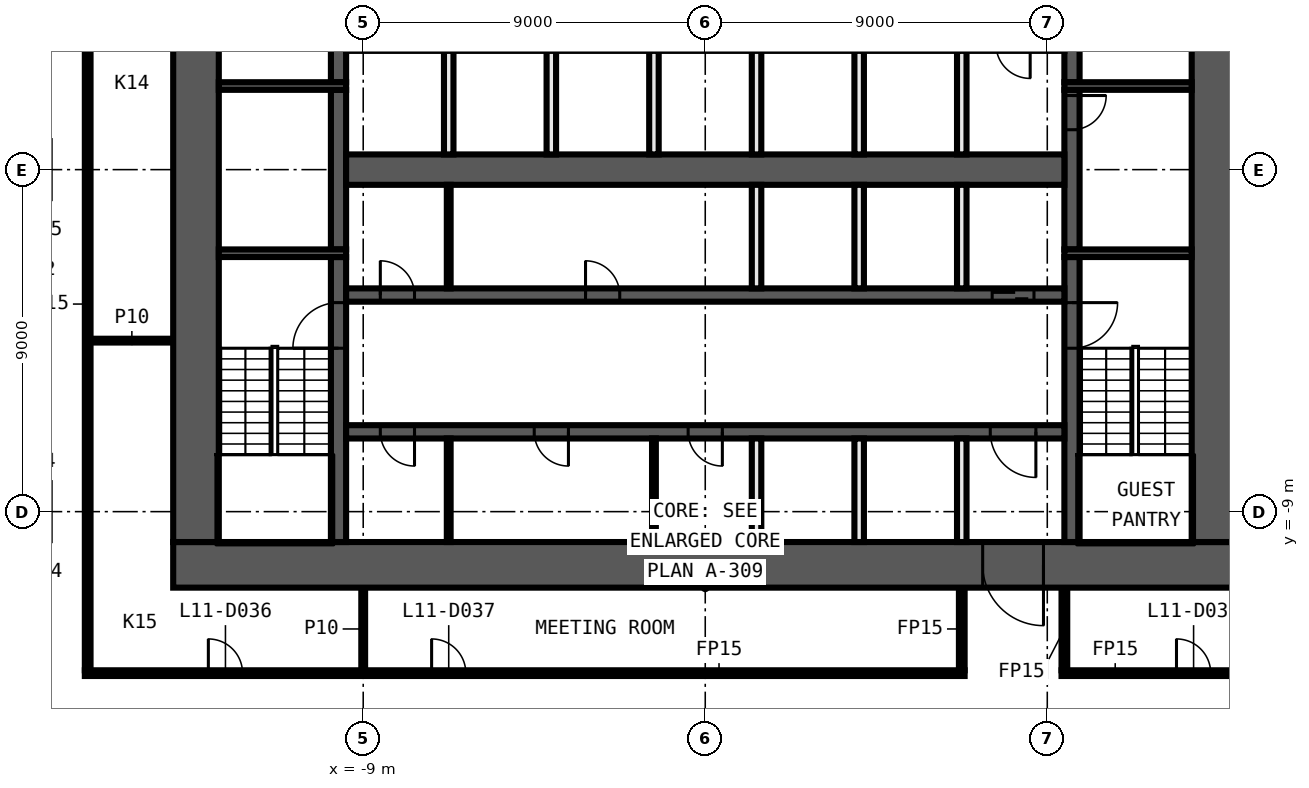
"""IFC4 building model, lengths in metres.
Left out: names, types, materials, properties, quantities, classifications, styles, units other than length and angle.
Written with IfcOpenShell. Run it as: python <this file> out.ifc"""

import sys

from ifc_helpers import new_model, si_unit, direction, frame, frame_2d, origin, place, context, subcontext, project, spatial, rectangle, extrude, element, fill, save


model = new_model("IFC4")
c1 = context("Model", 3, precision=1e-05, world=origin(), true_north=direction((0.0, 1.0)))
c2 = subcontext(c1, "Body", "Model", "MODEL_VIEW")
j1 = project(units=[si_unit("LENGTHUNIT", "METRE"), si_unit("PLANEANGLEUNIT", "RADIAN")], contexts=[c1])
p1 = place(None, origin())
s1 = spatial("IfcSite", under=j1, at=p1, CompositionType="ELEMENT")
p2 = place(p1, origin())
s2 = spatial("IfcBuilding", under=s1, at=p2, CompositionType="ELEMENT")
p3 = place(p2, frame((0.0, 0.0, 62.5)))
s3 = spatial("IfcBuildingStorey", under=s2, at=p3, CompositionType="ELEMENT", Elevation=62.5)
p4 = place(p3, frame((-16.325, -13.25, 0.0), z_axis=(0.0, 0.0, 1.0), x_axis=(1.0, 0.0, 0.0)))
e1 = element("IfcWall", 1, at=p4, inside=s3, PredefinedType="PARTITIONING", context=c2, shape_type="SweptSolid", body=[
    extrude(rectangle(XDim=23.15, YDim=0.15, at=frame_2d((11.575, 0.0))), origin(), (0.0, 0.0, 1.0), 3.3),
])
p5 = place(p4, frame((3.25, 0.0, 0.0)))
e2 = element("IfcOpeningElement", 2, at=p5, cuts=e1, PredefinedType="OPENING", context=c2, shape_type="SweptSolid", body=[
    extrude(rectangle(XDim=0.9, YDim=2.1, at=frame_2d((0.45, 1.05))), frame((0.0, 0.085, 0.0), z_axis=(0.0, -1.0, 0.0), x_axis=(1.0, 0.0, 0.0)), (0.0, 0.0, 1.0), 0.17),
])
p6 = place(p4, frame((9.125, 0.0, 0.0)))
e3 = element("IfcOpeningElement", 3, at=p6, cuts=e1, PredefinedType="OPENING", context=c2, shape_type="SweptSolid", body=[
    extrude(rectangle(XDim=0.9, YDim=2.1, at=frame_2d((0.45, 1.05))), frame((0.0, 0.085, 0.0), z_axis=(0.0, -1.0, 0.0), x_axis=(1.0, 0.0, 0.0)), (0.0, 0.0, 1.0), 0.17),
])
p7 = place(p3, frame((9.375, -13.25, 0.0), z_axis=(0.0, 0.0, 1.0), x_axis=(1.0, 0.0, 0.0)))
e4 = element("IfcWall", 4, at=p7, inside=s3, PredefinedType="PARTITIONING", context=c2, shape_type="SweptSolid", body=[
    extrude(rectangle(XDim=6.95, YDim=0.15, at=frame_2d((3.475, 0.0))), origin(), (0.0, 0.0, 1.0), 3.3),
])
p8 = place(p7, frame((3.025, 0.0, 0.0)))
e5 = element("IfcOpeningElement", 5, at=p8, cuts=e4, PredefinedType="OPENING", context=c2, shape_type="SweptSolid", body=[
    extrude(rectangle(XDim=0.9, YDim=2.1, at=frame_2d((0.45, 1.05))), frame((0.0, 0.085, 0.0), z_axis=(0.0, -1.0, 0.0), x_axis=(1.0, 0.0, 0.0)), (0.0, 0.0, 1.0), 0.17),
])
p9 = place(p3, frame((-16.175, -4.5, 0.0), z_axis=(0.0, 0.0, 1.0), x_axis=(1.0, 0.0, 0.0)))
e6 = element("IfcWall", 6, at=p9, inside=s3, PredefinedType="PARTITIONING", context=c2, shape_type="SweptSolid", body=[
    extrude(rectangle(XDim=2.175, YDim=0.1, at=frame_2d((1.087, 0.0))), origin(), (0.0, 0.0, 1.0), 3.3),
])
for number, where, z_axis, x_axis in (
    (7, (9.45, -13.175, 0.0), (0.0, 0.0, 1.0), (0.0, 1.0, 0.0)),
    (8, (6.75, -13.175, 0.0), (0.0, 0.0, 1.0), (0.0, 1.0, 0.0)),
):
    element("IfcWall", number, at=place(p3, frame(where, z_axis=z_axis, x_axis=x_axis)), inside=s3, PredefinedType="PARTITIONING", context=c2, shape_type="SweptSolid", body=[
        extrude(rectangle(XDim=2.175, YDim=0.15, at=frame_2d((1.087, 0.0))), origin(), (0.0, 0.0, 1.0), 3.3),
    ])
p10 = place(p3, frame((-9.0, -13.175, 0.0), z_axis=(0.0, 0.0, 1.0), x_axis=(0.0, 1.0, 0.0)))
e9 = element("IfcWall", 9, at=p10, inside=s3, PredefinedType="PARTITIONING", context=c2, shape_type="SweptSolid", body=[
    extrude(rectangle(XDim=2.175, YDim=0.1, at=frame_2d((1.087, 0.0))), origin(), (0.0, 0.0, 1.0), 3.3),
])
p11 = place(p3, frame((-16.25, 13.175, 0.0), z_axis=(0.0, 0.0, 1.0), x_axis=(0.0, -1.0, 0.0)))
e10 = element("IfcWall", 10, at=p11, inside=s3, PredefinedType="PARTITIONING", context=c2, shape_type="SweptSolid", body=[
    extrude(rectangle(XDim=26.35, YDim=0.15, at=frame_2d((13.175, 0.0))), origin(), (0.0, 0.0, 1.0), 3.3),
])
p12 = place(p11, frame((5.975, 0.0, 0.0)))
e11 = element("IfcOpeningElement", 11, at=p12, cuts=e10, PredefinedType="OPENING", context=c2, shape_type="SweptSolid", body=[
    extrude(rectangle(XDim=0.9, YDim=2.1, at=frame_2d((0.45, 1.05))), frame((0.0, 0.085, 0.0), z_axis=(0.0, -1.0, 0.0), x_axis=(1.0, 0.0, 0.0)), (0.0, 0.0, 1.0), 0.17),
])
p13 = place(p3, frame((14.0, -10.4, 0.0), z_axis=(0.0, 0.0, 1.0), x_axis=(-1.0, 0.0, 0.0)))
e12 = element("IfcWall", 12, at=p13, inside=s3, PredefinedType="SHEAR", context=c2, shape_type="SweptSolid", body=[
    extrude(rectangle(XDim=28.0, YDim=1.2, at=frame_2d((14.0, 0.0))), origin(), (0.0, 0.0, 1.0), 3.3),
])
p14 = place(p13, frame((5.1, 0.0, 0.0)))
e13 = element("IfcOpeningElement", 13, at=p14, cuts=e12, PredefinedType="OPENING", context=c2, shape_type="SweptSolid", body=[
    extrude(rectangle(XDim=1.6, YDim=2.1, at=frame_2d((0.8, 1.05))), frame((0.0, 0.61, 0.0), z_axis=(0.0, -1.0, 0.0), x_axis=(1.0, 0.0, 0.0)), (0.0, 0.0, 1.0), 1.22),
])
for number, where, z_axis, x_axis in (
    (14, (13.4, 9.8, 0.0), (0.0, 0.0, 1.0), (0.0, -1.0, 0.0)),
    (15, (-13.4, -9.8, 0.0), (0.0, 0.0, 1.0), (0.0, 1.0, 0.0)),
):
    element("IfcWall", number, at=place(p3, frame(where, z_axis=z_axis, x_axis=x_axis)), inside=s3, PredefinedType="SHEAR", context=c2, shape_type="SweptSolid", body=[
        extrude(rectangle(XDim=19.6, YDim=1.2, at=frame_2d((9.8, 0.0))), origin(), (0.0, 0.0, 1.0), 3.3),
    ])
p15 = place(p3, frame((9.65, -2.3, 0.0), z_axis=(0.0, 0.0, 1.0), x_axis=(0.0, -1.0, 0.0)))
e16 = element("IfcWall", 16, at=p15, inside=s3, PredefinedType="SHEAR", context=c2, shape_type="SweptSolid", body=[
    extrude(rectangle(XDim=7.5, YDim=0.4, at=frame_2d((3.75, 0.0))), origin(), (0.0, 0.0, 1.0), 3.3),
])
p16 = place(p15, frame((1.2, 0.0, 0.0)))
e17 = element("IfcOpeningElement", 17, at=p16, cuts=e16, PredefinedType="OPENING", context=c2, shape_type="SweptSolid", body=[
    extrude(rectangle(XDim=1.2, YDim=2.1, at=frame_2d((0.6, 1.05))), frame((0.0, 0.21, 0.0), z_axis=(0.0, -1.0, 0.0), x_axis=(1.0, 0.0, 0.0)), (0.0, 0.0, 1.0), 0.42),
])
p17 = place(p3, frame((9.65, 2.1, 0.0), z_axis=(0.0, 0.0, 1.0), x_axis=(0.0, -1.0, 0.0)))
e18 = element("IfcWall", 18, at=p17, inside=s3, PredefinedType="SHEAR", context=c2, shape_type="SweptSolid", body=[
    extrude(rectangle(XDim=4.2, YDim=0.4, at=frame_2d((2.1, 0.0))), origin(), (0.0, 0.0, 1.0), 3.3),
])
p18 = place(p17, frame((0.15, 0.0, 0.0)))
e19 = element("IfcOpeningElement", 19, at=p18, cuts=e18, PredefinedType="OPENING", context=c2, shape_type="SweptSolid", body=[
    extrude(rectangle(XDim=0.9, YDim=2.1, at=frame_2d((0.45, 1.05))), frame((0.0, 0.21, 0.0), z_axis=(0.0, -1.0, 0.0), x_axis=(1.0, 0.0, 0.0)), (0.0, 0.0, 1.0), 0.42),
])
p19 = place(p3, frame((9.65, 9.8, 0.0), z_axis=(0.0, 0.0, 1.0), x_axis=(0.0, -1.0, 0.0)))
e20 = element("IfcWall", 20, at=p19, inside=s3, PredefinedType="SHEAR", context=c2, shape_type="SweptSolid", body=[
    extrude(rectangle(XDim=7.5, YDim=0.4, at=frame_2d((3.75, 0.0))), origin(), (0.0, 0.0, 1.0), 3.3),
])
p20 = place(p19, frame((5.1, 0.0, 0.0)))
e21 = element("IfcOpeningElement", 21, at=p20, cuts=e20, PredefinedType="OPENING", context=c2, shape_type="SweptSolid", body=[
    extrude(rectangle(XDim=1.2, YDim=2.1, at=frame_2d((0.6, 1.05))), frame((0.0, 0.21, 0.0), z_axis=(0.0, -1.0, 0.0), x_axis=(1.0, 0.0, 0.0)), (0.0, 0.0, 1.0), 0.42),
])
p21 = place(p3, frame((-9.65, -9.8, 0.0), z_axis=(0.0, 0.0, 1.0), x_axis=(0.0, 1.0, 0.0)))
e22 = element("IfcWall", 22, at=p21, inside=s3, PredefinedType="SHEAR", context=c2, shape_type="SweptSolid", body=[
    extrude(rectangle(XDim=7.5, YDim=0.4, at=frame_2d((3.75, 0.0))), origin(), (0.0, 0.0, 1.0), 3.3),
])
p22 = place(p21, frame((5.1, 0.0, 0.0)))
e23 = element("IfcOpeningElement", 23, at=p22, cuts=e22, PredefinedType="OPENING", context=c2, shape_type="SweptSolid", body=[
    extrude(rectangle(XDim=1.2, YDim=2.1, at=frame_2d((0.6, 1.05))), frame((0.0, 0.21, 0.0), z_axis=(0.0, -1.0, 0.0), x_axis=(1.0, 0.0, 0.0)), (0.0, 0.0, 1.0), 0.42),
])
p23 = place(p3, frame((-9.65, -2.1, 0.0), z_axis=(0.0, 0.0, 1.0), x_axis=(0.0, 1.0, 0.0)))
e24 = element("IfcWall", 24, at=p23, inside=s3, PredefinedType="SHEAR", context=c2, shape_type="SweptSolid", body=[
    extrude(rectangle(XDim=4.2, YDim=0.4, at=frame_2d((2.1, 0.0))), origin(), (0.0, 0.0, 1.0), 3.3),
])
p24 = place(p3, frame((-9.65, 2.3, 0.0), z_axis=(0.0, 0.0, 1.0), x_axis=(0.0, 1.0, 0.0)))
e25 = element("IfcWall", 25, at=p24, inside=s3, PredefinedType="SHEAR", context=c2, shape_type="SweptSolid", body=[
    extrude(rectangle(XDim=7.5, YDim=0.4, at=frame_2d((3.75, 0.0))), origin(), (0.0, 0.0, 1.0), 3.3),
])
p25 = place(p24, frame((1.2, 0.0, 0.0)))
e26 = element("IfcOpeningElement", 26, at=p25, cuts=e25, PredefinedType="OPENING", context=c2, shape_type="SweptSolid", body=[
    extrude(rectangle(XDim=1.2, YDim=2.1, at=frame_2d((0.6, 1.05))), frame((0.0, 0.21, 0.0), z_axis=(0.0, -1.0, 0.0), x_axis=(1.0, 0.0, 0.0)), (0.0, 0.0, 1.0), 0.42),
])
for number, where, z_axis, x_axis in (
    (27, (9.45, 2.2, 0.0), (0.0, 0.0, 1.0), (1.0, 0.0, 0.0)),
    (28, (-9.45, 2.2, 0.0), (0.0, 0.0, 1.0), (-1.0, 0.0, 0.0)),
    (29, (9.45, -2.2, 0.0), (0.0, 0.0, 1.0), (1.0, 0.0, 0.0)),
    (30, (-9.45, -2.2, 0.0), (0.0, 0.0, 1.0), (-1.0, 0.0, 0.0)),
):
    element("IfcWall", number, at=place(p3, frame(where, z_axis=z_axis, x_axis=x_axis)), inside=s3, PredefinedType="SHEAR", context=c2, shape_type="SweptSolid", body=[
        extrude(rectangle(XDim=3.35, YDim=0.2, at=frame_2d((1.675, 0.0))), origin(), (0.0, 0.0, 1.0), 3.3),
    ])
p26 = place(p3, frame((-9.45, -3.3, 0.0), z_axis=(0.0, 0.0, 1.0), x_axis=(1.0, 0.0, 0.0)))
e31 = element("IfcWall", 31, at=p26, inside=s3, PredefinedType="SHEAR", context=c2, shape_type="SweptSolid", body=[
    extrude(rectangle(XDim=18.9, YDim=0.35, at=frame_2d((9.45, 0.0))), origin(), (0.0, 0.0, 1.0), 3.3),
])
p27 = place(p26, frame((17.0, 0.0, 0.0)))
e32 = element("IfcOpeningElement", 32, at=p27, cuts=e31, PredefinedType="OPENING", context=c2, shape_type="SweptSolid", body=[
    extrude(rectangle(XDim=1.1, YDim=2.1, at=frame_2d((0.55, 1.05))), frame((0.0, 0.185, 0.0), z_axis=(0.0, -1.0, 0.0), x_axis=(1.0, 0.0, 0.0)), (0.0, 0.0, 1.0), 0.37),
])
p28 = place(p26, frame((0.9, 0.0, 0.0)))
e33 = element("IfcOpeningElement", 33, at=p28, cuts=e31, PredefinedType="OPENING", context=c2, shape_type="SweptSolid", body=[
    extrude(rectangle(XDim=0.9, YDim=2.1, at=frame_2d((0.45, 1.05))), frame((0.0, 0.185, 0.0), z_axis=(0.0, -1.0, 0.0), x_axis=(1.0, 0.0, 0.0)), (0.0, 0.0, 1.0), 0.37),
])
p29 = place(p26, frame((6.3, 0.0, 0.0)))
e34 = element("IfcOpeningElement", 34, at=p29, cuts=e31, PredefinedType="OPENING", context=c2, shape_type="SweptSolid", body=[
    extrude(rectangle(XDim=0.9, YDim=2.1, at=frame_2d((0.45, 1.05))), frame((0.0, 0.185, 0.0), z_axis=(0.0, -1.0, 0.0), x_axis=(1.0, 0.0, 0.0)), (0.0, 0.0, 1.0), 0.37),
])
p30 = place(p3, frame((9.45, -6.9, 0.0), z_axis=(0.0, 0.0, 1.0), x_axis=(-1.0, 0.0, 0.0)))
e35 = element("IfcWall", 35, at=p30, inside=s3, PredefinedType="SHEAR", context=c2, shape_type="SweptSolid", body=[
    extrude(rectangle(XDim=18.9, YDim=0.35, at=frame_2d((9.45, 0.0))), origin(), (0.0, 0.0, 1.0), 3.3),
])
p31 = place(p30, frame((0.75, 0.0, 0.0)))
e36 = element("IfcOpeningElement", 36, at=p31, cuts=e35, PredefinedType="OPENING", context=c2, shape_type="SweptSolid", body=[
    extrude(rectangle(XDim=1.2, YDim=2.1, at=frame_2d((0.6, 1.05))), frame((0.0, 0.185, 0.0), z_axis=(0.0, -1.0, 0.0), x_axis=(1.0, 0.0, 0.0)), (0.0, 0.0, 1.0), 0.37),
])
p32 = place(p30, frame((17.1, 0.0, 0.0)))
e37 = element("IfcOpeningElement", 37, at=p32, cuts=e35, PredefinedType="OPENING", context=c2, shape_type="SweptSolid", body=[
    extrude(rectangle(XDim=0.9, YDim=2.1, at=frame_2d((0.45, 1.05))), frame((0.0, 0.185, 0.0), z_axis=(0.0, -1.0, 0.0), x_axis=(1.0, 0.0, 0.0)), (0.0, 0.0, 1.0), 0.37),
])
p33 = place(p30, frame((13.05, 0.0, 0.0)))
e38 = element("IfcOpeningElement", 38, at=p33, cuts=e35, PredefinedType="OPENING", context=c2, shape_type="SweptSolid", body=[
    extrude(rectangle(XDim=0.9, YDim=2.1, at=frame_2d((0.45, 1.05))), frame((0.0, 0.185, 0.0), z_axis=(0.0, -1.0, 0.0), x_axis=(1.0, 0.0, 0.0)), (0.0, 0.0, 1.0), 0.37),
])
p34 = place(p30, frame((9.0, 0.0, 0.0)))
e39 = element("IfcOpeningElement", 39, at=p34, cuts=e35, PredefinedType="OPENING", context=c2, shape_type="SweptSolid", body=[
    extrude(rectangle(XDim=0.9, YDim=2.1, at=frame_2d((0.45, 1.05))), frame((0.0, 0.185, 0.0), z_axis=(0.0, -1.0, 0.0), x_axis=(1.0, 0.0, 0.0)), (0.0, 0.0, 1.0), 0.37),
])
p35 = place(p3, frame((-9.45, 0.0, 0.0), z_axis=(0.0, 0.0, 1.0), x_axis=(1.0, 0.0, 0.0)))
e40 = element("IfcWall", 40, at=p35, inside=s3, PredefinedType="SHEAR", context=c2, shape_type="SweptSolid", body=[
    extrude(rectangle(XDim=18.9, YDim=0.8, at=frame_2d((9.45, 0.0))), origin(), (0.0, 0.0, 1.0), 3.3),
])
for number, where, z_axis, x_axis in (
    (41, (6.75, -9.8, 0.0), (0.0, 0.0, 1.0), (0.0, 1.0, 0.0)),
    (42, (6.75, -3.125, 0.0), (0.0, 0.0, 1.0), (0.0, 1.0, 0.0)),
    (43, (6.75, 0.4, 0.0), (0.0, 0.0, 1.0), (0.0, 1.0, 0.0)),
    (44, (4.05, -9.8, 0.0), (0.0, 0.0, 1.0), (0.0, 1.0, 0.0)),
    (45, (4.05, -3.125, 0.0), (0.0, 0.0, 1.0), (0.0, 1.0, 0.0)),
    (46, (4.05, 0.4, 0.0), (0.0, 0.0, 1.0), (0.0, 1.0, 0.0)),
    (47, (1.35, -9.8, 0.0), (0.0, 0.0, 1.0), (0.0, 1.0, 0.0)),
    (48, (1.35, -3.125, 0.0), (0.0, 0.0, 1.0), (0.0, 1.0, 0.0)),
    (49, (1.35, 0.4, 0.0), (0.0, 0.0, 1.0), (0.0, 1.0, 0.0)),
):
    element("IfcWall", number, at=place(p3, frame(where, z_axis=z_axis, x_axis=x_axis)), inside=s3, PredefinedType="SOLIDWALL", context=c2, shape_type="SweptSolid", body=[
        extrude(rectangle(XDim=2.725, YDim=0.25, at=frame_2d((1.363, 0.0))), origin(), (0.0, 0.0, 1.0), 3.3),
    ])
p36 = place(p3, frame((-1.35, -9.8, 0.0), z_axis=(0.0, 0.0, 1.0), x_axis=(0.0, 1.0, 0.0)))
e50 = element("IfcWall", 50, at=p36, inside=s3, PredefinedType="PARTITIONING", context=c2, shape_type="SweptSolid", body=[
    extrude(rectangle(XDim=2.725, YDim=0.1, at=frame_2d((1.363, 0.0))), origin(), (0.0, 0.0, 1.0), 3.3),
])
for number, where, z_axis, x_axis in (
    (51, (-1.35, 0.4, 0.0), (0.0, 0.0, 1.0), (0.0, 1.0, 0.0)),
    (52, (-4.05, 0.4, 0.0), (0.0, 0.0, 1.0), (0.0, 1.0, 0.0)),
):
    element("IfcWall", number, at=place(p3, frame(where, z_axis=z_axis, x_axis=x_axis)), inside=s3, PredefinedType="SOLIDWALL", context=c2, shape_type="SweptSolid", body=[
        extrude(rectangle(XDim=2.725, YDim=0.25, at=frame_2d((1.363, 0.0))), origin(), (0.0, 0.0, 1.0), 3.3),
    ])
for number, where, z_axis, x_axis in (
    (53, (-6.75, -9.8, 0.0), (0.0, 0.0, 1.0), (0.0, 1.0, 0.0)),
    (54, (-6.75, -3.125, 0.0), (0.0, 0.0, 1.0), (0.0, 1.0, 0.0)),
):
    element("IfcWall", number, at=place(p3, frame(where, z_axis=z_axis, x_axis=x_axis)), inside=s3, PredefinedType="PARTITIONING", context=c2, shape_type="SweptSolid", body=[
        extrude(rectangle(XDim=2.725, YDim=0.1, at=frame_2d((1.363, 0.0))), origin(), (0.0, 0.0, 1.0), 3.3),
    ])
p37 = place(p3, frame((-6.75, 0.4, 0.0), z_axis=(0.0, 0.0, 1.0), x_axis=(0.0, 1.0, 0.0)))
e55 = element("IfcWall", 55, at=p37, inside=s3, PredefinedType="SOLIDWALL", context=c2, shape_type="SweptSolid", body=[
    extrude(rectangle(XDim=2.725, YDim=0.25, at=frame_2d((1.363, 0.0))), origin(), (0.0, 0.0, 1.0), 3.3),
])
p38 = place(p5, origin())
e56 = element("IfcDoor", 56, at=p38, inside=s3, OperationType="SINGLE_SWING_LEFT", PredefinedType="DOOR", context=c2, shape_type="SweptSolid", body=[
    extrude(rectangle(XDim=0.9, YDim=2.1, at=frame_2d((0.45, 1.05))), frame((0.0, 0.025, 0.0), z_axis=(0.0, -1.0, 0.0), x_axis=(1.0, 0.0, 0.0)), (0.0, 0.0, 1.0), 0.05),
])
fill(e2, e56)
p39 = place(p6, origin())
e57 = element("IfcDoor", 57, at=p39, inside=s3, OperationType="SINGLE_SWING_RIGHT", PredefinedType="DOOR", context=c2, shape_type="SweptSolid", body=[
    extrude(rectangle(XDim=0.9, YDim=2.1, at=frame_2d((0.45, 1.05))), frame((0.0, 0.025, 0.0), z_axis=(0.0, -1.0, 0.0), x_axis=(1.0, 0.0, 0.0)), (0.0, 0.0, 1.0), 0.05),
])
fill(e3, e57)
p40 = place(p8, origin())
e58 = element("IfcDoor", 58, at=p40, inside=s3, OperationType="SINGLE_SWING_LEFT", PredefinedType="DOOR", context=c2, shape_type="SweptSolid", body=[
    extrude(rectangle(XDim=0.9, YDim=2.1, at=frame_2d((0.45, 1.05))), frame((0.0, 0.025, 0.0), z_axis=(0.0, -1.0, 0.0), x_axis=(1.0, 0.0, 0.0)), (0.0, 0.0, 1.0), 0.05),
])
fill(e5, e58)
p41 = place(p18, origin())
e59 = element("IfcDoor", 59, at=p41, inside=s3, OperationType="SINGLE_SWING_RIGHT", PredefinedType="DOOR", context=c2, shape_type="SweptSolid", body=[
    extrude(rectangle(XDim=0.9, YDim=2.1, at=frame_2d((0.45, 1.05))), frame((0.0, 0.025, 0.0), z_axis=(0.0, -1.0, 0.0), x_axis=(1.0, 0.0, 0.0)), (0.0, 0.0, 1.0), 0.05),
])
fill(e19, e59)
p42 = place(p27, origin())
e60 = element("IfcDoor", 60, at=p42, inside=s3, OperationType="DOUBLE_DOOR_SLIDING", PredefinedType="DOOR", context=c2, shape_type="SweptSolid", body=[
    extrude(rectangle(XDim=1.1, YDim=2.1, at=frame_2d((0.55, 1.05))), frame((0.0, 0.025, 0.0), z_axis=(0.0, -1.0, 0.0), x_axis=(1.0, 0.0, 0.0)), (0.0, 0.0, 1.0), 0.05),
])
fill(e32, e60)
p43 = place(p14, origin())
e61 = element("IfcDoor", 61, at=p43, inside=s3, OperationType="DOUBLE_DOOR_SINGLE_SWING", PredefinedType="DOOR", context=c2, shape_type="SweptSolid", body=[
    extrude(rectangle(XDim=1.6, YDim=2.1, at=frame_2d((0.8, 1.05))), frame((0.0, 0.025, 0.0), z_axis=(0.0, -1.0, 0.0), x_axis=(1.0, 0.0, 0.0)), (0.0, 0.0, 1.0), 0.05),
])
fill(e13, e61)
p44 = place(p31, origin())
e62 = element("IfcDoor", 62, at=p44, inside=s3, OperationType="SINGLE_SWING_LEFT", PredefinedType="DOOR", context=c2, shape_type="SweptSolid", body=[
    extrude(rectangle(XDim=1.2, YDim=2.1, at=frame_2d((0.6, 1.05))), frame((0.0, 0.025, 0.0), z_axis=(0.0, -1.0, 0.0), x_axis=(1.0, 0.0, 0.0)), (0.0, 0.0, 1.0), 0.05),
])
fill(e36, e62)
p45 = place(p28, origin())
e63 = element("IfcDoor", 63, at=p45, inside=s3, OperationType="SINGLE_SWING_RIGHT", PredefinedType="DOOR", context=c2, shape_type="SweptSolid", body=[
    extrude(rectangle(XDim=0.9, YDim=2.1, at=frame_2d((0.45, 1.05))), frame((0.0, 0.025, 0.0), z_axis=(0.0, -1.0, 0.0), x_axis=(1.0, 0.0, 0.0)), (0.0, 0.0, 1.0), 0.05),
])
fill(e33, e63)
p46 = place(p29, origin())
e64 = element("IfcDoor", 64, at=p46, inside=s3, OperationType="SINGLE_SWING_LEFT", PredefinedType="DOOR", context=c2, shape_type="SweptSolid", body=[
    extrude(rectangle(XDim=0.9, YDim=2.1, at=frame_2d((0.45, 1.05))), frame((0.0, 0.025, 0.0), z_axis=(0.0, -1.0, 0.0), x_axis=(1.0, 0.0, 0.0)), (0.0, 0.0, 1.0), 0.05),
])
fill(e34, e64)
p47 = place(p32, origin())
e65 = element("IfcDoor", 65, at=p47, inside=s3, OperationType="SINGLE_SWING_RIGHT", PredefinedType="DOOR", context=c2, shape_type="SweptSolid", body=[
    extrude(rectangle(XDim=0.9, YDim=2.1, at=frame_2d((0.45, 1.05))), frame((0.0, 0.025, 0.0), z_axis=(0.0, -1.0, 0.0), x_axis=(1.0, 0.0, 0.0)), (0.0, 0.0, 1.0), 0.05),
])
fill(e37, e65)
p48 = place(p33, origin())
e66 = element("IfcDoor", 66, at=p48, inside=s3, OperationType="SINGLE_SWING_LEFT", PredefinedType="DOOR", context=c2, shape_type="SweptSolid", body=[
    extrude(rectangle(XDim=0.9, YDim=2.1, at=frame_2d((0.45, 1.05))), frame((0.0, 0.025, 0.0), z_axis=(0.0, -1.0, 0.0), x_axis=(1.0, 0.0, 0.0)), (0.0, 0.0, 1.0), 0.05),
])
fill(e38, e66)
p49 = place(p34, origin())
e67 = element("IfcDoor", 67, at=p49, inside=s3, OperationType="SINGLE_SWING_RIGHT", PredefinedType="DOOR", context=c2, shape_type="SweptSolid", body=[
    extrude(rectangle(XDim=0.9, YDim=2.1, at=frame_2d((0.45, 1.05))), frame((0.0, 0.025, 0.0), z_axis=(0.0, -1.0, 0.0), x_axis=(1.0, 0.0, 0.0)), (0.0, 0.0, 1.0), 0.05),
])
fill(e39, e67)
p50 = place(p16, origin())
e68 = element("IfcDoor", 68, at=p50, inside=s3, OperationType="SINGLE_SWING_RIGHT", PredefinedType="DOOR", context=c2, shape_type="SweptSolid", body=[
    extrude(rectangle(XDim=1.2, YDim=2.1, at=frame_2d((0.6, 1.05))), frame((0.0, 0.025, 0.0), z_axis=(0.0, -1.0, 0.0), x_axis=(1.0, 0.0, 0.0)), (0.0, 0.0, 1.0), 0.05),
])
fill(e17, e68)
p51 = place(p22, origin())
e69 = element("IfcDoor", 69, at=p51, inside=s3, OperationType="SINGLE_SWING_LEFT", PredefinedType="DOOR", context=c2, shape_type="SweptSolid", body=[
    extrude(rectangle(XDim=1.2, YDim=2.1, at=frame_2d((0.6, 1.05))), frame((0.0, 0.025, 0.0), z_axis=(0.0, -1.0, 0.0), x_axis=(1.0, 0.0, 0.0)), (0.0, 0.0, 1.0), 0.05),
])
fill(e23, e69)
save(model, sys.argv[1])
